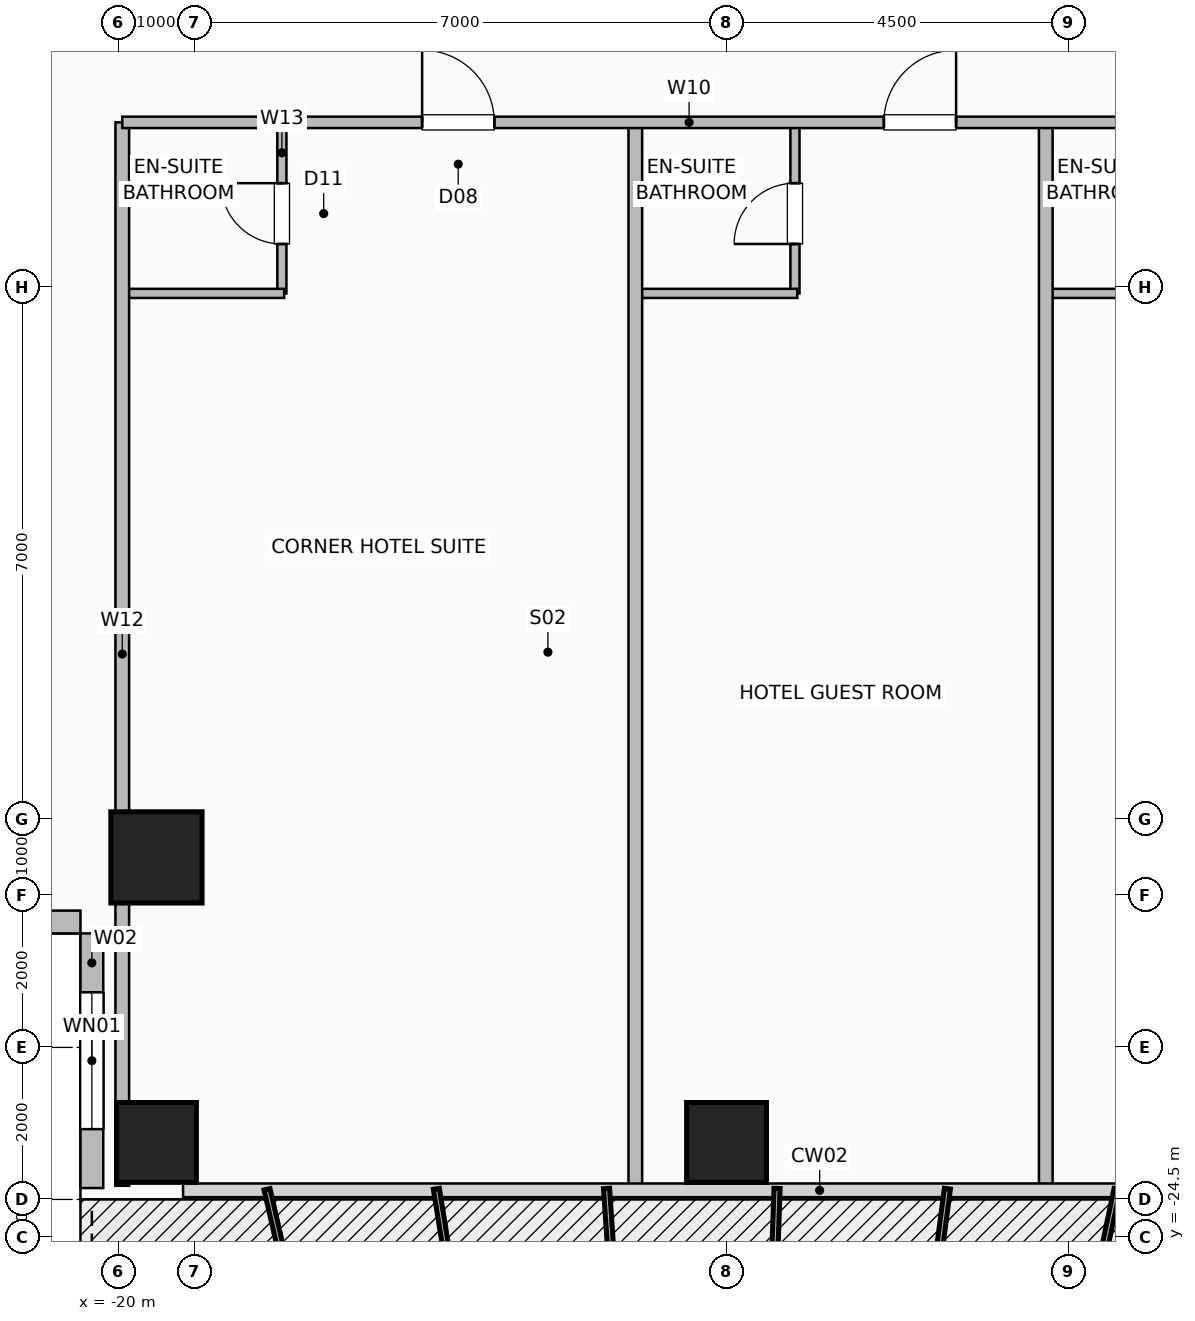
"""IFC4 building model, lengths in metres.
Left out: names, types, materials, properties, quantities, classifications, styles, units other than length and angle.
Written with IfcOpenShell. Run it as: python <this file> out.ifc"""

import sys

from ifc_helpers import new_model, si_unit, direction, frame, frame_2d, origin, origin_2d, place, context, subcontext, project, spatial, rectangle, hollow_rectangle, extrude, element, fill, save


model = new_model("IFC4")
c1 = context("Model", 3, precision=1e-05, world=origin(), true_north=direction((0.0, 1.0)))
c2 = subcontext(c1, "Body", "Model", "MODEL_VIEW")
j1 = project(units=[si_unit("LENGTHUNIT", "METRE"), si_unit("PLANEANGLEUNIT", "RADIAN")], contexts=[c1])
p1 = place(None, origin())
s1 = spatial("IfcSite", under=j1, at=p1, CompositionType="ELEMENT")
p2 = place(p1, origin())
s2 = spatial("IfcBuilding", under=s1, at=p2, CompositionType="ELEMENT")
p3 = place(p2, frame((0.0, 0.0, 27.0)))
s3 = spatial("IfcBuildingStorey", under=s2, at=p3, CompositionType="ELEMENT", Elevation=27.0)
p4 = place(p3, frame((-19.5, -23.25, 0.0), z_axis=(0.0, 0.0, 1.0), x_axis=(1.0, 0.0, 0.0)))
e1 = element("IfcColumn", 1, at=p4, inside=s3, PredefinedType="COLUMN", context=c2, shape_type="SweptSolid", body=[
    extrude(hollow_rectangle(XDim=1.05, YDim=1.05, WallThickness=0.05, at=origin_2d()), origin(), (0.0, 0.0, 1.0), 3.5),
])
p5 = place(p3, frame((-12.0, -23.25, -0.4), z_axis=(0.0, 0.0, 1.0), x_axis=(1.0, 0.0, 0.0)))
e2 = element("IfcColumn", 2, at=p5, inside=s3, PredefinedType="COLUMN", context=c2, shape_type="SweptSolid", body=[
    extrude(hollow_rectangle(XDim=1.05, YDim=1.05, WallThickness=0.05, at=origin_2d()), origin(), (0.0, 0.0, 1.0), 3.9),
])
p6 = place(p3, frame((-19.5, -19.5, 0.0), z_axis=(0.0, 0.0, 1.0), x_axis=(1.0, 0.0, 0.0)))
e3 = element("IfcColumn", 3, at=p6, inside=s3, PredefinedType="COLUMN", context=c2, shape_type="SweptSolid", body=[
    extrude(hollow_rectangle(XDim=1.2, YDim=1.2, WallThickness=0.055, at=origin_2d()), origin(), (0.0, 0.0, 1.0), 3.5),
])
p7 = place(p3, frame((-20.35, -23.85, 0.0), z_axis=(0.0, 0.0, 1.0), x_axis=(0.0, 1.0, 0.0)))
e4 = element("IfcWall", 4, at=p7, inside=s3, PredefinedType="SOLIDWALL", context=c2, shape_type="SweptSolid", body=[
    extrude(rectangle(XDim=3.35, YDim=0.3, at=frame_2d((1.675, 0.0))), origin(), (0.0, 0.0, 1.0), 3.25),
])
p8 = place(p7, frame((0.775, 0.0, 0.9)))
e5 = element("IfcOpeningElement", 5, at=p8, cuts=e4, PredefinedType="OPENING", context=c2, shape_type="SweptSolid", body=[
    extrude(rectangle(XDim=1.8, YDim=1.8, at=frame_2d((0.9, 0.9))), frame((0.0, 0.16, 0.0), z_axis=(0.0, -1.0, 0.0), x_axis=(1.0, 0.0, 0.0)), (0.0, 0.0, 1.0), 0.32),
])
p9 = place(p3, frame((-23.85, -20.35, 0.0), z_axis=(0.0, 0.0, 1.0), x_axis=(1.0, 0.0, 0.0)))
e6 = element("IfcWall", 6, at=p9, inside=s3, PredefinedType="SOLIDWALL", context=c2, shape_type="SweptSolid", body=[
    extrude(rectangle(XDim=3.35, YDim=0.3, at=frame_2d((1.675, 0.0))), origin(), (0.0, 0.0, 1.0), 3.25),
])
p10 = place(p3, frame((-17.85, -12.08, 0.0), z_axis=(0.0, 0.0, 1.0), x_axis=(0.0, 1.0, 0.0)))
e7 = element("IfcWall", 7, at=p10, inside=s3, PredefinedType="PLUMBINGWALL", context=c2, shape_type="SweptSolid", body=[
    extrude(rectangle(XDim=2.25, YDim=0.12, at=frame_2d((1.125, 0.0))), origin(), (0.0, 0.0, 1.0), 3.25),
])
p11 = place(p10, frame((0.65, 0.0, 0.0)))
e8 = element("IfcOpeningElement", 8, at=p11, cuts=e7, PredefinedType="OPENING", context=c2, shape_type="SweptSolid", body=[
    extrude(rectangle(XDim=0.8, YDim=2.05, at=frame_2d((0.4, 1.025))), frame((0.0, 0.07, 0.0), z_axis=(0.0, -1.0, 0.0), x_axis=(1.0, 0.0, 0.0)), (0.0, 0.0, 1.0), 0.14),
])
p12 = place(p3, frame((-19.92, -12.08, 0.0), z_axis=(0.0, 0.0, 1.0), x_axis=(1.0, 0.0, 0.0)))
e9 = element("IfcWall", 9, at=p12, inside=s3, PredefinedType="PLUMBINGWALL", context=c2, shape_type="SweptSolid", body=[
    extrude(rectangle(XDim=2.1, YDim=0.12, at=frame_2d((1.05, 0.0))), origin(), (0.0, 0.0, 1.0), 3.25),
])
p13 = place(p3, frame((-11.1, -12.08, 0.0), z_axis=(0.0, 0.0, 1.0), x_axis=(0.0, 1.0, 0.0)))
e10 = element("IfcWall", 10, at=p13, inside=s3, PredefinedType="PLUMBINGWALL", context=c2, shape_type="SweptSolid", body=[
    extrude(rectangle(XDim=2.25, YDim=0.12, at=frame_2d((1.125, 0.0))), origin(), (0.0, 0.0, 1.0), 3.25),
])
p14 = place(p13, frame((0.65, 0.0, 0.0)))
e11 = element("IfcOpeningElement", 11, at=p14, cuts=e10, PredefinedType="OPENING", context=c2, shape_type="SweptSolid", body=[
    extrude(rectangle(XDim=0.8, YDim=2.05, at=frame_2d((0.4, 1.025))), frame((0.0, 0.07, 0.0), z_axis=(0.0, -1.0, 0.0), x_axis=(1.0, 0.0, 0.0)), (0.0, 0.0, 1.0), 0.14),
])
p15 = place(p3, frame((-13.17, -12.08, 0.0), z_axis=(0.0, 0.0, 1.0), x_axis=(1.0, 0.0, 0.0)))
e12 = element("IfcWall", 12, at=p15, inside=s3, PredefinedType="PLUMBINGWALL", context=c2, shape_type="SweptSolid", body=[
    extrude(rectangle(XDim=2.1, YDim=0.12, at=frame_2d((1.05, 0.0))), origin(), (0.0, 0.0, 1.0), 3.25),
])
p16 = place(p3, frame((-7.77, -12.08, 0.0), z_axis=(0.0, 0.0, 1.0), x_axis=(1.0, 0.0, 0.0)))
e13 = element("IfcWall", 13, at=p16, inside=s3, PredefinedType="PLUMBINGWALL", context=c2, shape_type="SweptSolid", body=[
    extrude(rectangle(XDim=2.1, YDim=0.12, at=frame_2d((1.05, 0.0))), origin(), (0.0, 0.0, 1.0), 3.25),
])
for number, where, z_axis, x_axis in (
    (14, (-19.95, -23.82, 0.0), (0.0, 0.0, 1.0), (0.0, 1.0, 0.0)),
    (15, (-13.2, -23.82, 0.0), (0.0, 0.0, 1.0), (0.0, 1.0, 0.0)),
    (16, (-7.8, -23.82, 0.0), (0.0, 0.0, 1.0), (0.0, 1.0, 0.0)),
):
    element("IfcWall", number, at=place(p3, frame(where, z_axis=z_axis, x_axis=x_axis)), inside=s3, PredefinedType="PARTITIONING", context=c2, shape_type="SweptSolid", body=[
        extrude(rectangle(XDim=13.99, YDim=0.18, at=frame_2d((6.995, 0.0))), origin(), (0.0, 0.0, 1.0), 3.25),
    ])
p17 = place(p3, frame((-19.95, -9.83, 0.0), z_axis=(0.0, 0.0, 1.0), x_axis=(1.0, 0.0, 0.0)))
e17 = element("IfcWall", 17, at=p17, inside=s3, PredefinedType="PARTITIONING", context=c2, shape_type="SweptSolid", body=[
    extrude(rectangle(XDim=39.9, YDim=0.15, at=frame_2d((19.95, 0.0))), origin(), (0.0, 0.0, 1.0), 3.25),
])
p18 = place(p17, frame((3.945, 0.0, 0.0)))
e18 = element("IfcOpeningElement", 18, at=p18, cuts=e17, PredefinedType="OPENING", context=c2, shape_type="SweptSolid", body=[
    extrude(rectangle(XDim=0.95, YDim=2.08, at=frame_2d((0.475, 1.04))), frame((0.0, 0.085, 0.0), z_axis=(0.0, -1.0, 0.0), x_axis=(1.0, 0.0, 0.0)), (0.0, 0.0, 1.0), 0.17),
])
p19 = place(p17, frame((10.02, 0.0, 0.0)))
e19 = element("IfcOpeningElement", 19, at=p19, cuts=e17, PredefinedType="OPENING", context=c2, shape_type="SweptSolid", body=[
    extrude(rectangle(XDim=0.95, YDim=2.08, at=frame_2d((0.475, 1.04))), frame((0.0, 0.085, 0.0), z_axis=(0.0, -1.0, 0.0), x_axis=(1.0, 0.0, 0.0)), (0.0, 0.0, 1.0), 0.17),
])
p20 = place(p17, frame((15.42, 0.0, 0.0)))
e20 = element("IfcOpeningElement", 20, at=p20, cuts=e17, PredefinedType="OPENING", context=c2, shape_type="SweptSolid", body=[
    extrude(rectangle(XDim=0.95, YDim=2.08, at=frame_2d((0.475, 1.04))), frame((0.0, 0.085, 0.0), z_axis=(0.0, -1.0, 0.0), x_axis=(1.0, 0.0, 0.0)), (0.0, 0.0, 1.0), 0.17),
])
p21 = place(p17, frame((20.702, 0.0, 0.0)))
e21 = element("IfcOpeningElement", 21, at=p21, cuts=e17, PredefinedType="OPENING", context=c2, shape_type="SweptSolid", body=[
    extrude(rectangle(XDim=0.95, YDim=2.08, at=frame_2d((0.475, 1.04))), frame((0.0, 0.085, 0.0), z_axis=(0.0, -1.0, 0.0), x_axis=(1.0, 0.0, 0.0)), (0.0, 0.0, 1.0), 0.17),
])
p22 = place(p17, frame((26.02, 0.0, 0.0)))
e22 = element("IfcOpeningElement", 22, at=p22, cuts=e17, PredefinedType="OPENING", context=c2, shape_type="SweptSolid", body=[
    extrude(rectangle(XDim=0.95, YDim=2.08, at=frame_2d((0.475, 1.04))), frame((0.0, 0.085, 0.0), z_axis=(0.0, -1.0, 0.0), x_axis=(1.0, 0.0, 0.0)), (0.0, 0.0, 1.0), 0.17),
])
p23 = place(p17, frame((31.37, 0.0, 0.0)))
e23 = element("IfcOpeningElement", 23, at=p23, cuts=e17, PredefinedType="OPENING", context=c2, shape_type="SweptSolid", body=[
    extrude(rectangle(XDim=0.95, YDim=2.08, at=frame_2d((0.475, 1.04))), frame((0.0, 0.085, 0.0), z_axis=(0.0, -1.0, 0.0), x_axis=(1.0, 0.0, 0.0)), (0.0, 0.0, 1.0), 0.17),
])
p24 = place(p17, frame((37.245, 0.0, 0.0)))
e24 = element("IfcOpeningElement", 24, at=p24, cuts=e17, PredefinedType="OPENING", context=c2, shape_type="SweptSolid", body=[
    extrude(rectangle(XDim=0.95, YDim=2.08, at=frame_2d((0.475, 1.04))), frame((0.0, 0.085, 0.0), z_axis=(0.0, -1.0, 0.0), x_axis=(1.0, 0.0, 0.0)), (0.0, 0.0, 1.0), 0.17),
])
p25 = place(p8, origin())
e25 = element("IfcWindow", 25, at=p25, inside=s3, PartitioningType="SINGLE_PANEL", PredefinedType="WINDOW", context=c2, shape_type="SweptSolid", body=[
    extrude(rectangle(XDim=1.8, YDim=1.8, at=frame_2d((0.9, 0.9))), frame((0.0, 0.03, 0.0), z_axis=(0.0, -1.0, 0.0), x_axis=(1.0, 0.0, 0.0)), (0.0, 0.0, 1.0), 0.06),
])
fill(e5, e25)
p26 = place(p11, origin())
e26 = element("IfcDoor", 26, at=p26, inside=s3, OperationType="SINGLE_SWING_RIGHT", PredefinedType="DOOR", context=c2, shape_type="SweptSolid", body=[
    extrude(rectangle(XDim=0.8, YDim=2.05, at=frame_2d((0.4, 1.025))), frame((0.0, 0.025, 0.0), z_axis=(0.0, -1.0, 0.0), x_axis=(1.0, 0.0, 0.0)), (0.0, 0.0, 1.0), 0.05),
])
fill(e8, e26)
p27 = place(p14, origin())
e27 = element("IfcDoor", 27, at=p27, inside=s3, OperationType="SINGLE_SWING_LEFT", PredefinedType="DOOR", context=c2, shape_type="SweptSolid", body=[
    extrude(rectangle(XDim=0.8, YDim=2.05, at=frame_2d((0.4, 1.025))), frame((0.0, 0.025, 0.0), z_axis=(0.0, -1.0, 0.0), x_axis=(1.0, 0.0, 0.0)), (0.0, 0.0, 1.0), 0.05),
])
fill(e11, e27)
p28 = place(p18, origin())
e28 = element("IfcDoor", 28, at=p28, inside=s3, OperationType="SINGLE_SWING_LEFT", PredefinedType="DOOR", context=c2, shape_type="SweptSolid", body=[
    extrude(rectangle(XDim=0.95, YDim=2.08, at=frame_2d((0.475, 1.04))), frame((0.0, 0.025, 0.0), z_axis=(0.0, -1.0, 0.0), x_axis=(1.0, 0.0, 0.0)), (0.0, 0.0, 1.0), 0.05),
])
fill(e18, e28)
p29 = place(p19, origin())
e29 = element("IfcDoor", 29, at=p29, inside=s3, OperationType="SINGLE_SWING_RIGHT", PredefinedType="DOOR", context=c2, shape_type="SweptSolid", body=[
    extrude(rectangle(XDim=0.95, YDim=2.08, at=frame_2d((0.475, 1.04))), frame((0.0, 0.025, 0.0), z_axis=(0.0, -1.0, 0.0), x_axis=(1.0, 0.0, 0.0)), (0.0, 0.0, 1.0), 0.05),
])
fill(e19, e29)
save(model, sys.argv[1])
